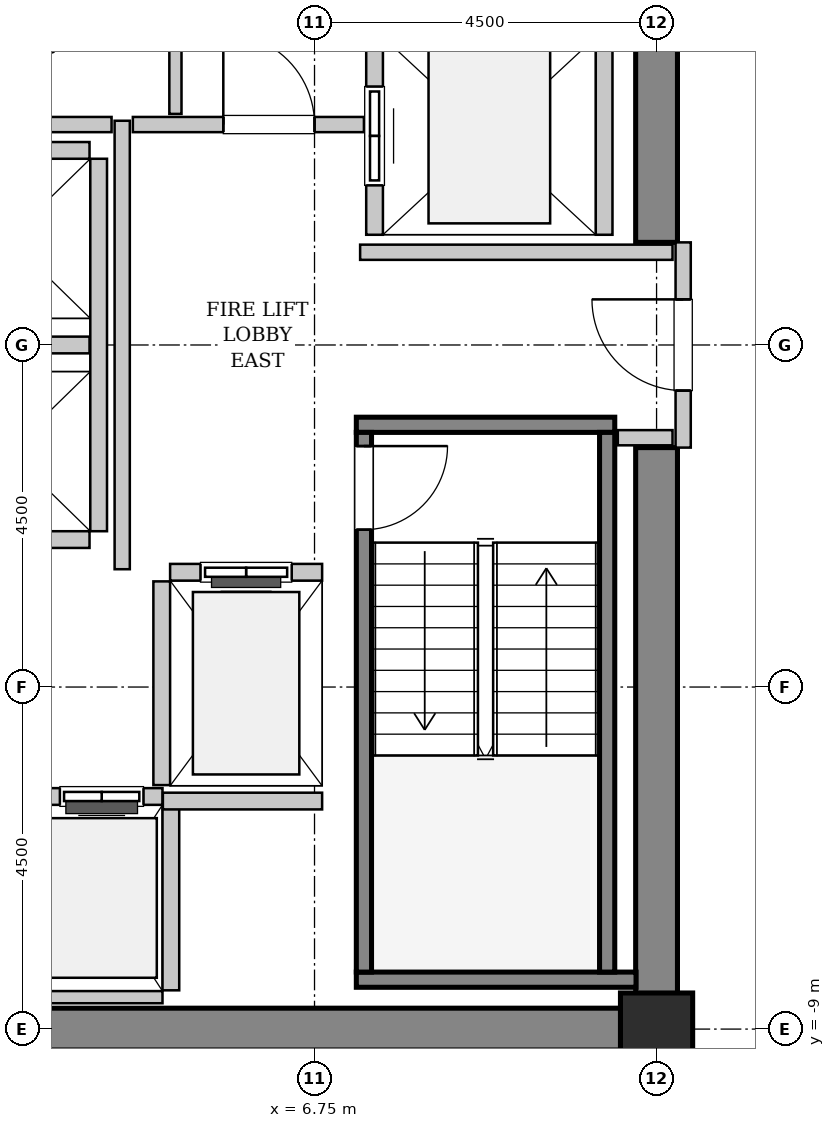
"""IFC4 building model, lengths in metres.
Left out: names, types, materials, properties, quantities, classifications, styles, units other than length and angle.
Written with IfcOpenShell. Run it as: python <this file> out.ifc"""

import sys

from ifc_helpers import new_model, si_unit, direction, frame, frame_2d, origin, origin_2d, place, context, subcontext, project, spatial, rectangle, hollow_rectangle, extrude, source, transform, mapped, element, fill, save


model = new_model("IFC4")
c1 = context("Model", 3, precision=1e-05, world=origin(), true_north=direction((0.0, 1.0)))
c2 = subcontext(c1, "Body", "Model", "MODEL_VIEW")
j1 = project(units=[si_unit("LENGTHUNIT", "METRE"), si_unit("PLANEANGLEUNIT", "RADIAN")], contexts=[c1])
p1 = place(None, origin())
s1 = spatial("IfcSite", under=j1, at=p1, CompositionType="ELEMENT")
p2 = place(p1, origin())
s2 = spatial("IfcBuilding", under=s1, at=p2, CompositionType="ELEMENT")
p3 = place(p2, frame((0.0, 0.0, 171.6)))
s3 = spatial("IfcBuildingStorey", under=s2, at=p3, CompositionType="ELEMENT", Elevation=171.6)
m1 = source(origin(), c2, "Body", "SweptSolid", [
    extrude(rectangle(XDim=9.975, YDim=0.55, at=frame_2d((4.987, 0.0))), origin(), (0.0, 0.0, 1.0), 3.8),
])
p4 = place(p3, frame((1.55, -9.0, 0.0), z_axis=(0.0, 0.0, 1.0), x_axis=(1.0, 0.0, 0.0)))
e1 = element("IfcWall", 1, at=p4, inside=s3, PredefinedType="SHEAR", context=c2, shape_type="MappedRepresentation", body=[
    mapped(m1, transform((0.0, 0.0, 0.0), x_axis=(1.0, 0.0, 0.0), y_axis=(0.0, 1.0, 0.0), z_axis=(0.0, 0.0, 1.0), scale=1.0)),
])
m2 = source(origin(), c2, "Body", "SweptSolid", [
    extrude(rectangle(XDim=7.375, YDim=0.55, at=frame_2d((3.688, 0.0))), origin(), (0.0, 0.0, 1.0), 3.8),
])
for number, where, z_axis, x_axis in (
    (2, (11.25, -8.725, 0.0), (0.0, 0.0, 1.0), (0.0, 1.0, 0.0)),
    (3, (11.25, 1.35, 0.0), (0.0, 0.0, 1.0), (0.0, 1.0, 0.0)),
):
    element("IfcWall", number, at=place(p3, frame(where, z_axis=z_axis, x_axis=x_axis)), inside=s3, PredefinedType="SHEAR", context=c2, shape_type="MappedRepresentation", body=[
        mapped(m2, transform((0.0, 0.0, 0.0), x_axis=(1.0, 0.0, 0.0), y_axis=(0.0, 1.0, 0.0), z_axis=(0.0, 0.0, 1.0), scale=1.0)),
    ])
m3 = source(origin(), c2, "Body", "SweptSolid", [
    extrude(hollow_rectangle(XDim=0.95, YDim=0.95, WallThickness=0.045, InnerFilletRadius=0.045, OuterFilletRadius=0.09, at=origin_2d()), origin(), (0.0, 0.0, 1.0), 3.8),
])
p5 = place(p3, frame((11.25, -9.0, 0.0), z_axis=(0.0, 0.0, 1.0), x_axis=(1.0, 0.0, 0.0)))
e4 = element("IfcColumn", 4, at=p5, inside=s3, PredefinedType="COLUMN", context=c2, shape_type="MappedRepresentation", body=[
    mapped(m3, transform((0.0, 0.0, 0.0), x_axis=(1.0, 0.0, 0.0), y_axis=(0.0, 1.0, 0.0), z_axis=(0.0, 0.0, 1.0), scale=1.0)),
])
m4 = source(origin(), c2, "Body", "SweptSolid", [
    extrude(rectangle(XDim=3.4, YDim=0.2, at=frame_2d((1.7, 0.0))), origin(), (0.0, 0.0, 1.0), 3.8),
])
p6 = place(p3, frame((7.3, -1.05, 0.0), z_axis=(0.0, 0.0, 1.0), x_axis=(1.0, 0.0, 0.0)))
e5 = element("IfcWall", 5, at=p6, inside=s3, PredefinedType="SOLIDWALL", context=c2, shape_type="MappedRepresentation", body=[
    mapped(m4, transform((0.0, 0.0, 0.0), x_axis=(1.0, 0.0, 0.0), y_axis=(0.0, 1.0, 0.0), z_axis=(0.0, 0.0, 1.0), scale=1.0)),
])
m5 = source(origin(), c2, "Body", "SweptSolid", [
    extrude(rectangle(XDim=3.68, YDim=0.2, at=frame_2d((1.84, 0.0))), origin(), (0.0, 0.0, 1.0), 3.8),
])
p7 = place(p3, frame((7.3, -8.35, 0.0), z_axis=(0.0, 0.0, 1.0), x_axis=(1.0, 0.0, 0.0)))
e6 = element("IfcWall", 6, at=p7, inside=s3, PredefinedType="SOLIDWALL", context=c2, shape_type="MappedRepresentation", body=[
    mapped(m5, transform((0.0, 0.0, 0.0), x_axis=(1.0, 0.0, 0.0), y_axis=(0.0, 1.0, 0.0), z_axis=(0.0, 0.0, 1.0), scale=1.0)),
])
m6 = source(origin(), c2, "Body", "SweptSolid", [
    extrude(rectangle(XDim=7.1, YDim=0.2, at=frame_2d((3.55, 0.0))), origin(), (0.0, 0.0, 1.0), 3.8),
])
p8 = place(p3, frame((7.4, -1.15, 0.0), z_axis=(0.0, 0.0, 1.0), x_axis=(0.0, -1.0, 0.0)))
e7 = element("IfcWall", 7, at=p8, inside=s3, PredefinedType="SOLIDWALL", context=c2, shape_type="MappedRepresentation", body=[
    mapped(m6, transform((0.0, 0.0, 0.0), x_axis=(1.0, 0.0, 0.0), y_axis=(0.0, 1.0, 0.0), z_axis=(0.0, 0.0, 1.0), scale=1.0)),
])
p9 = place(p8, frame((0.18, 0.0, 0.0)))
e8 = element("IfcOpeningElement", 8, at=p9, cuts=e7, PredefinedType="OPENING", context=c2, shape_type="SweptSolid", body=[
    extrude(rectangle(XDim=1.1, YDim=2.15, at=frame_2d((0.55, 1.075))), frame((0.0, 0.11, 0.0), z_axis=(0.0, -1.0, 0.0), x_axis=(1.0, 0.0, 0.0)), (0.0, 0.0, 1.0), 0.22),
])
p10 = place(p3, frame((10.6, -1.15, 0.0), z_axis=(0.0, 0.0, 1.0), x_axis=(0.0, -1.0, 0.0)))
e9 = element("IfcWall", 9, at=p10, inside=s3, PredefinedType="SOLIDWALL", context=c2, shape_type="MappedRepresentation", body=[
    mapped(m6, transform((0.0, 0.0, 0.0), x_axis=(1.0, 0.0, 0.0), y_axis=(0.0, 1.0, 0.0), z_axis=(0.0, 0.0, 1.0), scale=1.0)),
])
m7 = source(origin(), c2, "Body", "SweptSolid", [
    extrude(rectangle(XDim=2.0, YDim=0.22, at=frame_2d((1.0, 0.0))), origin(), (0.0, 0.0, 1.0), 3.535),
])
p11 = place(p3, frame((6.85, -2.99, 0.0), z_axis=(0.0, 0.0, 1.0), x_axis=(-1.0, 0.0, 0.0)))
e10 = element("IfcWall", 10, at=p11, inside=s3, PredefinedType="SOLIDWALL", context=c2, shape_type="MappedRepresentation", body=[
    mapped(m7, transform((0.0, 0.0, 0.0), x_axis=(1.0, 0.0, 0.0), y_axis=(0.0, 1.0, 0.0), z_axis=(0.0, 0.0, 1.0), scale=1.0)),
])
p12 = place(p11, frame((0.4, 0.0, 0.0)))
e11 = element("IfcOpeningElement", 11, at=p12, cuts=e10, PredefinedType="OPENING", context=c2, shape_type="SweptSolid", body=[
    extrude(rectangle(XDim=1.2, YDim=2.2, at=frame_2d((0.6, 1.1))), frame((0.0, 0.12, 0.0), z_axis=(0.0, -1.0, 0.0), x_axis=(1.0, 0.0, 0.0)), (0.0, 0.0, 1.0), 0.24),
])
m8 = source(origin(), c2, "Body", "SweptSolid", [
    extrude(rectangle(XDim=2.68, YDim=0.22, at=frame_2d((1.34, 0.0))), origin(), (0.0, 0.0, 1.0), 3.535),
])
p13 = place(p3, frame((4.74, -3.11, 0.0), z_axis=(0.0, 0.0, 1.0), x_axis=(0.0, -1.0, 0.0)))
e12 = element("IfcWall", 12, at=p13, inside=s3, PredefinedType="SOLIDWALL", context=c2, shape_type="MappedRepresentation", body=[
    mapped(m8, transform((0.0, 0.0, 0.0), x_axis=(1.0, 0.0, 0.0), y_axis=(0.0, 1.0, 0.0), z_axis=(0.0, 0.0, 1.0), scale=1.0)),
])
m9 = source(origin(), c2, "Body", "SweptSolid", [
    extrude(rectangle(XDim=5.45, YDim=0.22, at=frame_2d((2.725, 0.0))), origin(), (0.0, 0.0, 1.0), 3.535),
])
p14 = place(p3, frame((7.54, 6.9, 0.0), z_axis=(0.0, 0.0, 1.0), x_axis=(0.0, -1.0, 0.0)))
e13 = element("IfcWall", 13, at=p14, inside=s3, PredefinedType="SOLIDWALL", context=c2, shape_type="MappedRepresentation", body=[
    mapped(m9, transform((0.0, 0.0, 0.0), x_axis=(1.0, 0.0, 0.0), y_axis=(0.0, 1.0, 0.0), z_axis=(0.0, 0.0, 1.0), scale=1.0)),
])
p15 = place(p14, frame((3.5, 0.0, 0.0)))
e14 = element("IfcOpeningElement", 14, at=p15, cuts=e13, PredefinedType="OPENING", context=c2, shape_type="SweptSolid", body=[
    extrude(rectangle(XDim=1.3, YDim=2.3, at=frame_2d((0.65, 1.15))), frame((0.0, 0.12, 0.0), z_axis=(0.0, -1.0, 0.0), x_axis=(1.0, 0.0, 0.0)), (0.0, 0.0, 1.0), 0.24),
])
p16 = place(p14, frame((0.65, 0.0, 0.0)))
e15 = element("IfcOpeningElement", 15, at=p16, cuts=e13, PredefinedType="OPENING", context=c2, shape_type="SweptSolid", body=[
    extrude(rectangle(XDim=1.3, YDim=2.3, at=frame_2d((0.65, 1.15))), frame((0.0, 0.12, 0.0), z_axis=(0.0, -1.0, 0.0), x_axis=(1.0, 0.0, 0.0)), (0.0, 0.0, 1.0), 0.24),
])
p17 = place(p3, frame((10.56, 1.45, 0.0), z_axis=(0.0, 0.0, 1.0), x_axis=(0.0, 1.0, 0.0)))
e16 = element("IfcWall", 16, at=p17, inside=s3, PredefinedType="SOLIDWALL", context=c2, shape_type="MappedRepresentation", body=[
    mapped(m9, transform((0.0, 0.0, 0.0), x_axis=(1.0, 0.0, 0.0), y_axis=(0.0, 1.0, 0.0), z_axis=(0.0, 0.0, 1.0), scale=1.0)),
])
m10 = source(origin(), c2, "Body", "SweptSolid", [
    extrude(rectangle(XDim=3.2, YDim=0.22, at=frame_2d((1.6, 0.0))), origin(), (0.0, 0.0, 1.0), 3.535),
])
p18 = place(p3, frame((4.75, -5.94, 0.0), z_axis=(0.0, 0.0, 1.0), x_axis=(-1.0, 0.0, 0.0)))
e17 = element("IfcWall", 17, at=p18, inside=s3, PredefinedType="SOLIDWALL", context=c2, shape_type="MappedRepresentation", body=[
    mapped(m10, transform((0.0, 0.0, 0.0), x_axis=(1.0, 0.0, 0.0), y_axis=(0.0, 1.0, 0.0), z_axis=(0.0, 0.0, 1.0), scale=1.0)),
])
p19 = place(p18, frame((1.875, 0.0, 0.0)))
e18 = element("IfcOpeningElement", 18, at=p19, cuts=e17, PredefinedType="OPENING", context=c2, shape_type="SweptSolid", body=[
    extrude(rectangle(XDim=1.1, YDim=2.2, at=frame_2d((0.55, 1.1))), frame((0.0, 0.12, 0.0), z_axis=(0.0, -1.0, 0.0), x_axis=(1.0, 0.0, 0.0)), (0.0, 0.0, 1.0), 0.24),
])
p20 = place(p18, frame((0.25, 0.0, 0.0)))
e19 = element("IfcOpeningElement", 19, at=p20, cuts=e17, PredefinedType="OPENING", context=c2, shape_type="SweptSolid", body=[
    extrude(rectangle(XDim=1.1, YDim=2.2, at=frame_2d((0.55, 1.1))), frame((0.0, 0.12, 0.0), z_axis=(0.0, -1.0, 0.0), x_axis=(1.0, 0.0, 0.0)), (0.0, 0.0, 1.0), 0.24),
])
m11 = source(origin(), c2, "Body", "SweptSolid", [
    extrude(rectangle(XDim=3.2, YDim=0.16, at=frame_2d((1.6, 0.0))), origin(), (0.0, 0.0, 1.0), 2.425),
])
p21 = place(p3, frame((1.55, -8.58, 0.0), z_axis=(0.0, 0.0, 1.0), x_axis=(1.0, 0.0, 0.0)))
e20 = element("IfcWall", 20, at=p21, inside=s3, PredefinedType="PARTITIONING", context=c2, shape_type="MappedRepresentation", body=[
    mapped(m11, transform((0.0, 0.0, 0.0), x_axis=(1.0, 0.0, 0.0), y_axis=(0.0, 1.0, 0.0), z_axis=(0.0, 0.0, 1.0), scale=1.0)),
])
m12 = source(origin(), c2, "Body", "SweptSolid", [
    extrude(rectangle(XDim=2.43, YDim=0.22, at=frame_2d((1.215, 0.0))), origin(), (0.0, 0.0, 1.0), 3.535),
])
p22 = place(p3, frame((4.86, -8.49, 0.0), z_axis=(0.0, 0.0, 1.0), x_axis=(0.0, 1.0, 0.0)))
e21 = element("IfcWall", 21, at=p22, inside=s3, PredefinedType="SOLIDWALL", context=c2, shape_type="MappedRepresentation", body=[
    mapped(m12, transform((0.0, 0.0, 0.0), x_axis=(1.0, 0.0, 0.0), y_axis=(0.0, 1.0, 0.0), z_axis=(0.0, 0.0, 1.0), scale=1.0)),
])
m13 = source(origin(), c2, "Body", "SweptSolid", [
    extrude(rectangle(XDim=4.9, YDim=0.22, at=frame_2d((2.45, 0.0))), origin(), (0.0, 0.0, 1.0), 3.535),
])
p23 = place(p3, frame((3.91, -2.45, 0.0), z_axis=(0.0, 0.0, 1.0), x_axis=(0.0, 1.0, 0.0)))
e22 = element("IfcWall", 22, at=p23, inside=s3, PredefinedType="SOLIDWALL", context=c2, shape_type="MappedRepresentation", body=[
    mapped(m13, transform((0.0, 0.0, 0.0), x_axis=(1.0, 0.0, 0.0), y_axis=(0.0, 1.0, 0.0), z_axis=(0.0, 0.0, 1.0), scale=1.0)),
])
m14 = source(origin(), c2, "Body", "SweptSolid", [
    extrude(rectangle(XDim=2.13, YDim=0.22, at=frame_2d((1.065, 0.0))), origin(), (0.0, 0.0, 1.0), 3.535),
])
for number, where, z_axis, x_axis in (
    (23, (1.66, -2.56, 0.0), (0.0, 0.0, 1.0), (1.0, 0.0, 0.0)),
    (24, (1.66, 0.0, 0.0), (0.0, 0.0, 1.0), (1.0, 0.0, 0.0)),
    (25, (3.79, 2.56, 0.0), (0.0, 0.0, 1.0), (-1.0, 0.0, 0.0)),
):
    element("IfcWall", number, at=place(p3, frame(where, z_axis=z_axis, x_axis=x_axis)), inside=s3, PredefinedType="SOLIDWALL", context=c2, shape_type="MappedRepresentation", body=[
        mapped(m14, transform((0.0, 0.0, 0.0), x_axis=(1.0, 0.0, 0.0), y_axis=(0.0, 1.0, 0.0), z_axis=(0.0, 0.0, 1.0), scale=1.0)),
    ])
m15 = source(origin(), c2, "Body", "SweptSolid", [
    extrude(rectangle(XDim=2.095, YDim=0.22, at=frame_2d((1.048, 0.0))), origin(), (0.0, 0.0, 1.0), 3.535),
])
p24 = place(p3, frame((4.755, -6.0, 0.0), z_axis=(0.0, 0.0, 1.0), x_axis=(1.0, 0.0, 0.0)))
e26 = element("IfcWall", 26, at=p24, inside=s3, PredefinedType="SOLIDWALL", context=c2, shape_type="MappedRepresentation", body=[
    mapped(m15, transform((0.0, 0.0, 0.0), x_axis=(1.0, 0.0, 0.0), y_axis=(0.0, 1.0, 0.0), z_axis=(0.0, 0.0, 1.0), scale=1.0)),
])
m16 = source(origin(), c2, "Body", "SweptSolid", [
    extrude(rectangle(XDim=2.7, YDim=0.2, at=frame_2d((1.35, 0.0))), origin(), (0.0, 0.0, 1.0), 2.425),
])
p25 = place(p3, frame((11.6, -1.35, 0.0), z_axis=(0.0, 0.0, 1.0), x_axis=(0.0, 1.0, 0.0)))
e27 = element("IfcWall", 27, at=p25, inside=s3, PredefinedType="PARTITIONING", context=c2, shape_type="MappedRepresentation", body=[
    mapped(m16, transform((0.0, 0.0, 0.0), x_axis=(1.0, 0.0, 0.0), y_axis=(0.0, 1.0, 0.0), z_axis=(0.0, 0.0, 1.0), scale=1.0)),
])
p26 = place(p25, frame((0.75, 0.0, 0.0)))
e28 = element("IfcOpeningElement", 28, at=p26, cuts=e27, PredefinedType="OPENING", context=c2, shape_type="SweptSolid", body=[
    extrude(rectangle(XDim=1.2, YDim=2.15, at=frame_2d((0.6, 1.075))), frame((0.0, 0.11, 0.0), z_axis=(0.0, -1.0, 0.0), x_axis=(1.0, 0.0, 0.0)), (0.0, 0.0, 1.0), 0.22),
])
m17 = source(origin(), c2, "Body", "SweptSolid", [
    extrude(rectangle(XDim=5.9, YDim=0.2, at=frame_2d((2.95, 0.0))), origin(), (0.0, 0.0, 1.0), 3.535),
])
p27 = place(p3, frame((4.22, -2.95, 0.0), z_axis=(0.0, 0.0, 1.0), x_axis=(0.0, 1.0, 0.0)))
e29 = element("IfcWall", 29, at=p27, inside=s3, PredefinedType="PARTITIONING", context=c2, shape_type="MappedRepresentation", body=[
    mapped(m17, transform((0.0, 0.0, 0.0), x_axis=(1.0, 0.0, 0.0), y_axis=(0.0, 1.0, 0.0), z_axis=(0.0, 0.0, 1.0), scale=1.0)),
])
m18 = source(origin(), c2, "Body", "SweptSolid", [
    extrude(rectangle(XDim=2.52, YDim=0.2, at=frame_2d((1.26, 0.0))), origin(), (0.0, 0.0, 1.0), 3.535),
])
p28 = place(p3, frame((1.56, 2.9, 0.0), z_axis=(0.0, 0.0, 1.0), x_axis=(1.0, 0.0, 0.0)))
e30 = element("IfcWall", 30, at=p28, inside=s3, PredefinedType="PARTITIONING", context=c2, shape_type="MappedRepresentation", body=[
    mapped(m18, transform((0.0, 0.0, 0.0), x_axis=(1.0, 0.0, 0.0), y_axis=(0.0, 1.0, 0.0), z_axis=(0.0, 0.0, 1.0), scale=1.0)),
])
m19 = source(origin(), c2, "Body", "SweptSolid", [
    extrude(rectangle(XDim=3.04, YDim=0.2, at=frame_2d((1.52, 0.0))), origin(), (0.0, 0.0, 1.0), 3.535),
])
p29 = place(p3, frame((4.36, 2.9, 0.0), z_axis=(0.0, 0.0, 1.0), x_axis=(1.0, 0.0, 0.0)))
e31 = element("IfcWall", 31, at=p29, inside=s3, PredefinedType="PARTITIONING", context=c2, shape_type="MappedRepresentation", body=[
    mapped(m19, transform((0.0, 0.0, 0.0), x_axis=(1.0, 0.0, 0.0), y_axis=(0.0, 1.0, 0.0), z_axis=(0.0, 0.0, 1.0), scale=1.0)),
])
p30 = place(p29, frame((1.19, 0.0, 0.0)))
e32 = element("IfcOpeningElement", 32, at=p30, cuts=e31, PredefinedType="OPENING", context=c2, shape_type="SweptSolid", body=[
    extrude(rectangle(XDim=1.2, YDim=2.15, at=frame_2d((0.6, 1.075))), frame((0.0, 0.11, 0.0), z_axis=(0.0, -1.0, 0.0), x_axis=(1.0, 0.0, 0.0)), (0.0, 0.0, 1.0), 0.22),
])
m20 = source(origin(), c2, "Body", "SweptSolid", [
    extrude(rectangle(XDim=4.11, YDim=0.2, at=frame_2d((2.055, 0.0))), origin(), (0.0, 0.0, 1.0), 3.535),
])
p31 = place(p3, frame((7.35, 1.22, 0.0), z_axis=(0.0, 0.0, 1.0), x_axis=(1.0, 0.0, 0.0)))
e33 = element("IfcWall", 33, at=p31, inside=s3, PredefinedType="PARTITIONING", context=c2, shape_type="MappedRepresentation", body=[
    mapped(m20, transform((0.0, 0.0, 0.0), x_axis=(1.0, 0.0, 0.0), y_axis=(0.0, 1.0, 0.0), z_axis=(0.0, 0.0, 1.0), scale=1.0)),
])
m21 = source(origin(), c2, "Body", "SweptSolid", [
    extrude(rectangle(XDim=0.72, YDim=0.2, at=frame_2d((0.36, 0.0))), origin(), (0.0, 0.0, 1.0), 3.535),
])
p32 = place(p3, frame((10.74, -1.22, 0.0), z_axis=(0.0, 0.0, 1.0), x_axis=(1.0, 0.0, 0.0)))
e34 = element("IfcWall", 34, at=p32, inside=s3, PredefinedType="PARTITIONING", context=c2, shape_type="MappedRepresentation", body=[
    mapped(m21, transform((0.0, 0.0, 0.0), x_axis=(1.0, 0.0, 0.0), y_axis=(0.0, 1.0, 0.0), z_axis=(0.0, 0.0, 1.0), scale=1.0)),
])
m22 = source(origin(), c2, "Body", "SweptSolid", [
    extrude(rectangle(XDim=5.45, YDim=0.16, at=frame_2d((2.725, 0.0))), origin(), (0.0, 0.0, 1.0), 3.535),
])
p33 = place(p3, frame((4.92, 3.04, 0.0), z_axis=(0.0, 0.0, 1.0), x_axis=(0.0, 1.0, 0.0)))
e35 = element("IfcWall", 35, at=p33, inside=s3, PredefinedType="PARTITIONING", context=c2, shape_type="MappedRepresentation", body=[
    mapped(m22, transform((0.0, 0.0, 0.0), x_axis=(1.0, 0.0, 0.0), y_axis=(0.0, 1.0, 0.0), z_axis=(0.0, 0.0, 1.0), scale=1.0)),
])
m23 = source(origin(), c2, "Body", "SweptSolid", [
    extrude(rectangle(XDim=1.1, YDim=2.15, at=frame_2d((0.55, 1.075))), frame((0.0, 0.025, 0.0), z_axis=(0.0, -1.0, 0.0), x_axis=(1.0, 0.0, 0.0)), (0.0, 0.0, 1.0), 0.05),
])
p34 = place(p9, origin())
e36 = element("IfcDoor", 36, at=p34, inside=s3, OperationType="SINGLE_SWING_LEFT", PredefinedType="DOOR", context=c2, shape_type="MappedRepresentation", body=[
    mapped(m23, transform((0.0, 0.0, 0.0), x_axis=(1.0, 0.0, 0.0), y_axis=(0.0, 1.0, 0.0), z_axis=(0.0, 0.0, 1.0), scale=1.0)),
])
fill(e8, e36)
m24 = source(origin(), c2, "Body", "SweptSolid", [
    extrude(rectangle(XDim=1.2, YDim=2.2, at=frame_2d((0.6, 1.1))), frame((0.0, 0.025, 0.0), z_axis=(0.0, -1.0, 0.0), x_axis=(1.0, 0.0, 0.0)), (0.0, 0.0, 1.0), 0.05),
])
p35 = place(p12, origin())
e37 = element("IfcDoor", 37, at=p35, inside=s3, OperationType="SLIDING_TO_LEFT", PredefinedType="DOOR", context=c2, shape_type="MappedRepresentation", body=[
    mapped(m24, transform((0.0, 0.0, 0.0), x_axis=(1.0, 0.0, 0.0), y_axis=(0.0, 1.0, 0.0), z_axis=(0.0, 0.0, 1.0), scale=1.0)),
])
fill(e11, e37)
m25 = source(origin(), c2, "Body", "SweptSolid", [
    extrude(rectangle(XDim=1.3, YDim=2.3, at=frame_2d((0.65, 1.15))), frame((0.0, 0.025, 0.0), z_axis=(0.0, -1.0, 0.0), x_axis=(1.0, 0.0, 0.0)), (0.0, 0.0, 1.0), 0.05),
])
p36 = place(p15, origin())
e38 = element("IfcDoor", 38, at=p36, inside=s3, OperationType="SLIDING_TO_RIGHT", PredefinedType="DOOR", context=c2, shape_type="MappedRepresentation", body=[
    mapped(m25, transform((0.0, 0.0, 0.0), x_axis=(1.0, 0.0, 0.0), y_axis=(0.0, 1.0, 0.0), z_axis=(0.0, 0.0, 1.0), scale=1.0)),
])
fill(e14, e38)
m26 = source(origin(), c2, "Body", "SweptSolid", [
    extrude(rectangle(XDim=1.1, YDim=2.2, at=frame_2d((0.55, 1.1))), frame((0.0, 0.025, 0.0), z_axis=(0.0, -1.0, 0.0), x_axis=(1.0, 0.0, 0.0)), (0.0, 0.0, 1.0), 0.05),
])
p37 = place(p20, origin())
e39 = element("IfcDoor", 39, at=p37, inside=s3, OperationType="DOUBLE_DOOR_SLIDING", PredefinedType="DOOR", context=c2, shape_type="MappedRepresentation", body=[
    mapped(m26, transform((0.0, 0.0, 0.0), x_axis=(1.0, 0.0, 0.0), y_axis=(0.0, 1.0, 0.0), z_axis=(0.0, 0.0, 1.0), scale=1.0)),
])
fill(e19, e39)
m27 = source(origin(), c2, "Body", "SweptSolid", [
    extrude(rectangle(XDim=1.2, YDim=2.15, at=frame_2d((0.6, 1.075))), frame((0.0, 0.025, 0.0), z_axis=(0.0, -1.0, 0.0), x_axis=(1.0, 0.0, 0.0)), (0.0, 0.0, 1.0), 0.05),
])
p38 = place(p26, origin())
e40 = element("IfcDoor", 40, at=p38, inside=s3, OperationType="SINGLE_SWING_RIGHT", PredefinedType="DOOR", context=c2, shape_type="MappedRepresentation", body=[
    mapped(m27, transform((0.0, 0.0, 0.0), x_axis=(1.0, 0.0, 0.0), y_axis=(0.0, 1.0, 0.0), z_axis=(0.0, 0.0, 1.0), scale=1.0)),
])
fill(e28, e40)
p39 = place(p30, origin())
e41 = element("IfcDoor", 41, at=p39, inside=s3, OperationType="SINGLE_SWING_LEFT", PredefinedType="DOOR", context=c2, shape_type="MappedRepresentation", body=[
    mapped(m27, transform((0.0, 0.0, 0.0), x_axis=(1.0, 0.0, 0.0), y_axis=(0.0, 1.0, 0.0), z_axis=(0.0, 0.0, 1.0), scale=1.0)),
])
fill(e32, e41)
save(model, sys.argv[1])
